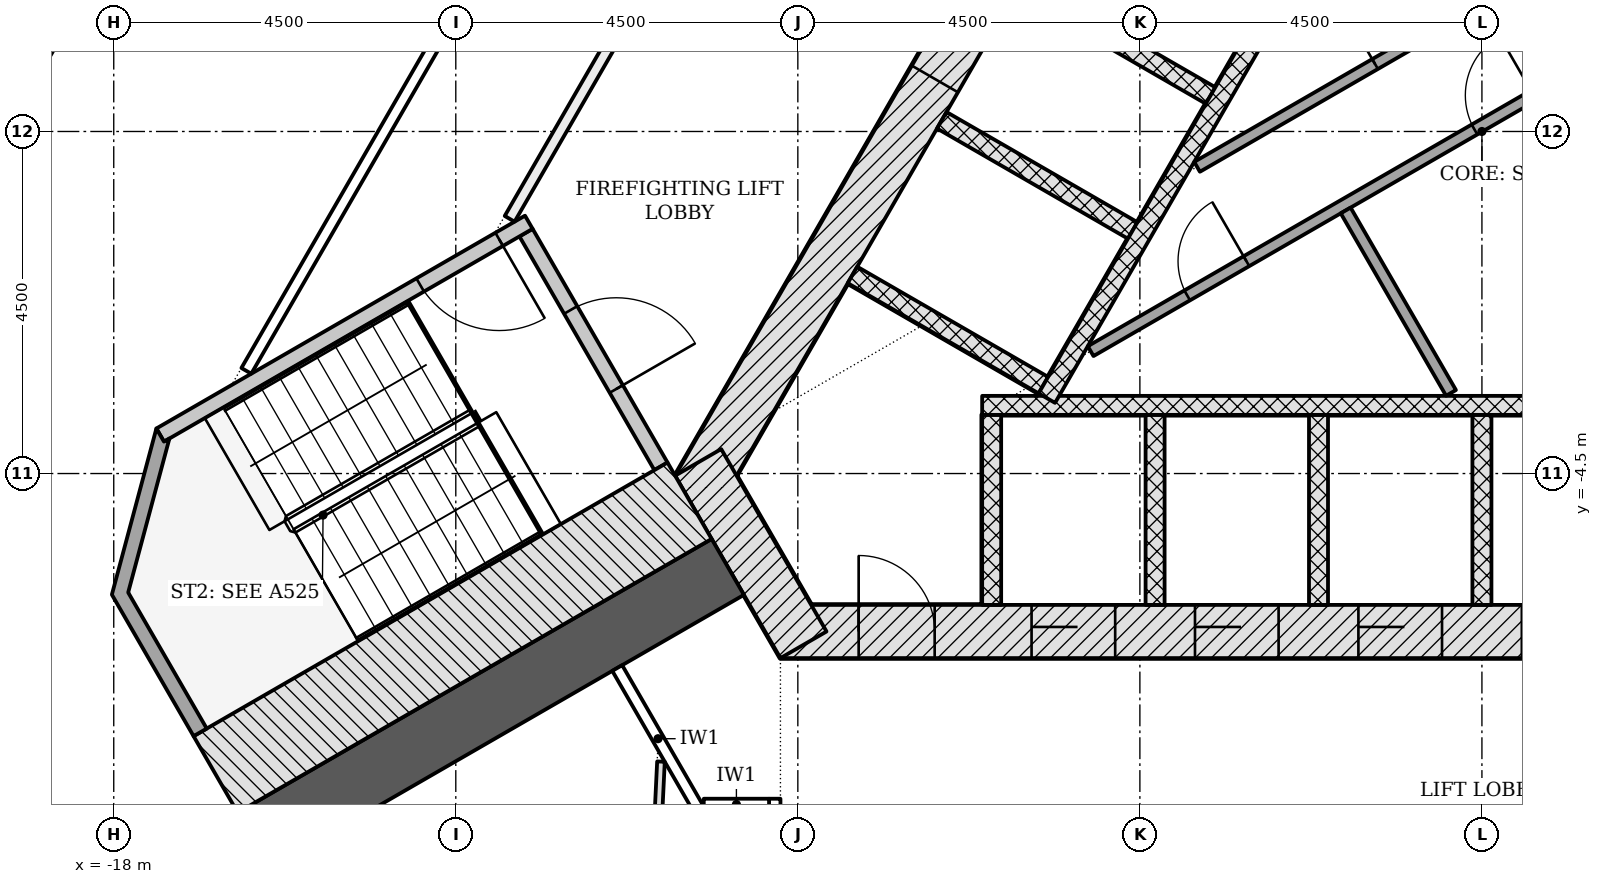
"""IFC4 building model, lengths in metres.
Left out: names, types, materials, properties, quantities, classifications, styles, units other than length and angle.
Written with IfcOpenShell. Run it as: python <this file> out.ifc"""

import sys

from ifc_helpers import new_model, si_unit, direction, frame, frame_2d, origin, place, context, subcontext, project, spatial, polyline, rectangle, outline, extrude, element, fill, save


model = new_model("IFC4")
c1 = context("Model", 3, precision=1e-05, world=origin(), true_north=direction((0.0, 1.0)))
c2 = subcontext(c1, "Body", "Model", "MODEL_VIEW")
j1 = project(units=[si_unit("LENGTHUNIT", "METRE"), si_unit("PLANEANGLEUNIT", "RADIAN")], contexts=[c1])
p1 = place(None, origin())
s1 = spatial("IfcSite", under=j1, at=p1, CompositionType="ELEMENT")
p2 = place(p1, origin())
s2 = spatial("IfcBuilding", under=s1, at=p2, CompositionType="ELEMENT")
p3 = place(p2, frame((0.0, 0.0, 69.0)))
s3 = spatial("IfcBuildingStorey", under=s2, at=p3, CompositionType="ELEMENT", Elevation=69.0)
p4 = place(p3, frame((-9.229, -6.578, -0.2), z_axis=(0.0, 0.0, 1.0), x_axis=(1.0, 0.0, 0.0)))
e1 = element("IfcWall", 1, at=p4, inside=s3, PredefinedType="SHEAR", context=c2, shape_type="SweptSolid", body=[
    extrude(rectangle(XDim=18.458, YDim=0.7, at=frame_2d((9.229, 0.0))), origin(), (0.0, 0.0, 1.0), 3.6),
])
p5 = place(p4, frame((3.304, 0.0, 0.2)))
e2 = element("IfcOpeningElement", 2, at=p5, cuts=e1, PredefinedType="OPENING", context=c2, shape_type="SweptSolid", body=[
    extrude(rectangle(XDim=1.1, YDim=2.1, at=frame_2d((0.55, 1.05))), frame((0.0, 0.36, 0.0), z_axis=(0.0, -1.0, 0.0), x_axis=(1.0, 0.0, 0.0)), (0.0, 0.0, 1.0), 0.72),
])
p6 = place(p4, frame((5.454, 0.0, 0.2)))
e3 = element("IfcOpeningElement", 3, at=p6, cuts=e1, PredefinedType="OPENING", context=c2, shape_type="SweptSolid", body=[
    extrude(rectangle(XDim=1.1, YDim=2.1, at=frame_2d((0.55, 1.05))), frame((0.0, 0.36, 0.0), z_axis=(0.0, -1.0, 0.0), x_axis=(1.0, 0.0, 0.0)), (0.0, 0.0, 1.0), 0.72),
])
p7 = place(p4, frame((7.604, 0.0, 0.2)))
e4 = element("IfcOpeningElement", 4, at=p7, cuts=e1, PredefinedType="OPENING", context=c2, shape_type="SweptSolid", body=[
    extrude(rectangle(XDim=1.1, YDim=2.1, at=frame_2d((0.55, 1.05))), frame((0.0, 0.36, 0.0), z_axis=(0.0, -1.0, 0.0), x_axis=(1.0, 0.0, 0.0)), (0.0, 0.0, 1.0), 0.72),
])
p8 = place(p4, frame((9.754, 0.0, 0.2)))
e5 = element("IfcOpeningElement", 5, at=p8, cuts=e1, PredefinedType="OPENING", context=c2, shape_type="SweptSolid", body=[
    extrude(rectangle(XDim=1.1, YDim=2.1, at=frame_2d((0.55, 1.05))), frame((0.0, 0.36, 0.0), z_axis=(0.0, -1.0, 0.0), x_axis=(1.0, 0.0, 0.0)), (0.0, 0.0, 1.0), 0.72),
])
p9 = place(p4, frame((11.904, 0.0, 0.2)))
e6 = element("IfcOpeningElement", 6, at=p9, cuts=e1, PredefinedType="OPENING", context=c2, shape_type="SweptSolid", body=[
    extrude(rectangle(XDim=1.1, YDim=2.1, at=frame_2d((0.55, 1.05))), frame((0.0, 0.36, 0.0), z_axis=(0.0, -1.0, 0.0), x_axis=(1.0, 0.0, 0.0)), (0.0, 0.0, 1.0), 0.72),
])
p10 = place(p4, frame((14.054, 0.0, 0.2)))
e7 = element("IfcOpeningElement", 7, at=p10, cuts=e1, PredefinedType="OPENING", context=c2, shape_type="SweptSolid", body=[
    extrude(rectangle(XDim=1.1, YDim=2.1, at=frame_2d((0.55, 1.05))), frame((0.0, 0.36, 0.0), z_axis=(0.0, -1.0, 0.0), x_axis=(1.0, 0.0, 0.0)), (0.0, 0.0, 1.0), 0.72),
])
p11 = place(p4, frame((1.029, 0.0, 0.2)))
e8 = element("IfcOpeningElement", 8, at=p11, cuts=e1, PredefinedType="OPENING", context=c2, shape_type="SweptSolid", body=[
    extrude(rectangle(XDim=1.0, YDim=2.1, at=frame_2d((0.5, 1.05))), frame((0.0, 0.36, 0.0), z_axis=(0.0, -1.0, 0.0), x_axis=(1.0, 0.0, 0.0)), (0.0, 0.0, 1.0), 0.72),
])
p12 = place(p3, frame((-1.083, 11.281, -0.2), z_axis=(0.0, 0.0, 1.0), x_axis=(-0.500001446645, -0.866024568562, 0.0)))
e9 = element("IfcWall", 9, at=p12, inside=s3, PredefinedType="SHEAR", context=c2, shape_type="SweptSolid", body=[
    extrude(rectangle(XDim=18.458, YDim=0.7, at=frame_2d((9.229, 0.0))), origin(), (0.0, 0.0, 1.0), 3.6),
])
p13 = place(p12, frame((8.979, 0.0, 0.2)))
e10 = element("IfcOpeningElement", 10, at=p13, cuts=e9, PredefinedType="OPENING", context=c2, shape_type="SweptSolid", body=[
    extrude(rectangle(XDim=1.2, YDim=2.1, at=frame_2d((0.6, 1.05))), frame((0.0, 0.36, 0.0), z_axis=(0.0, -1.0, 0.0), x_axis=(1.0, 0.0, 0.0)), (0.0, 0.0, 1.0), 0.72),
])
p14 = place(p12, frame((11.029, 0.0, 0.2)))
e11 = element("IfcOpeningElement", 11, at=p14, cuts=e9, PredefinedType="OPENING", context=c2, shape_type="SweptSolid", body=[
    extrude(rectangle(XDim=1.2, YDim=2.1, at=frame_2d((0.6, 1.05))), frame((0.0, 0.36, 0.0), z_axis=(0.0, -1.0, 0.0), x_axis=(1.0, 0.0, 0.0)), (0.0, 0.0, 1.0), 0.72),
])
p15 = place(p3, frame((-10.311, -4.353, -0.2), z_axis=(0.0, 0.0, 1.0), x_axis=(0.500042739161, -0.866000726912, 0.0)))
e12 = element("IfcWall", 12, at=p15, inside=s3, PredefinedType="SHEAR", context=c2, shape_type="SweptSolid", body=[
    extrude(rectangle(XDim=2.771, YDim=0.7, at=frame_2d((1.386, 0.0))), origin(), (0.0, 0.0, 1.0), 3.6),
])
p16 = place(p3, frame((-9.922, -5.728, -0.2), z_axis=(0.0, 0.0, 1.0), x_axis=(-0.866026077102, -0.499998833779, 0.0)))
e13 = element("IfcWall", 13, at=p16, inside=s3, PredefinedType="SHEAR", context=c2, shape_type="SweptSolid", body=[
    extrude(rectangle(XDim=13.381, YDim=0.85, at=frame_2d((6.691, 0.0))), origin(), (0.0, 0.0, 1.0), 3.6),
])
for number, where, z_axis, x_axis in (
    (14, (-6.45, -6.228, -0.2), (0.0, 0.0, 1.0), (0.0, 1.0, 0.0)),
    (15, (-4.3, -6.228, -0.2), (0.0, 0.0, 1.0), (0.0, 1.0, 0.0)),
    (16, (-2.15, -6.228, -0.2), (0.0, 0.0, 1.0), (0.0, 1.0, 0.0)),
    (17, (0.0, -6.228, -0.2), (0.0, 0.0, 1.0), (0.0, 1.0, 0.0)),
):
    element("IfcWall", number, at=place(p3, frame(where, z_axis=z_axis, x_axis=x_axis)), inside=s3, PredefinedType="PARTITIONING", context=c2, shape_type="SweptSolid", body=[
        extrude(rectangle(XDim=2.5, YDim=0.25, at=frame_2d((1.25, 0.0))), origin(), (0.0, 0.0, 1.0), 3.6),
    ])
p17 = place(p3, frame((-6.575, -3.603, 0.0), z_axis=(0.0, 0.0, 1.0), x_axis=(1.0, 0.0, 0.0)))
e18 = element("IfcWall", 18, at=p17, inside=s3, PredefinedType="PARTITIONING", context=c2, shape_type="SweptSolid", body=[
    extrude(rectangle(XDim=13.15, YDim=0.25, at=frame_2d((6.575, 0.0))), origin(), (0.0, 0.0, 1.0), 3.4),
])
for number, where, z_axis, x_axis in (
    (19, (-6.081, 1.923, -0.2), (0.0, 0.0, 1.0), (0.866, -0.5, 0.0)),
    (20, (-7.106, 0.148, -0.2), (0.0, 0.0, 1.0), (0.866, -0.5, 0.0)),
    (21, (-8.281, -1.887, -0.2), (0.0, 0.0, 1.0), (0.866, -0.5, 0.0)),
):
    element("IfcWall", number, at=place(p3, frame(where, z_axis=z_axis, x_axis=x_axis)), inside=s3, PredefinedType="PARTITIONING", context=c2, shape_type="SweptSolid", body=[
        extrude(rectangle(XDim=2.9, YDim=0.25, at=frame_2d((1.45, 0.0))), origin(), (0.0, 0.0, 1.0), 3.6),
    ])
p18 = place(p3, frame((0.176, 6.711, 0.0), z_axis=(0.0, 0.0, 1.0), x_axis=(-0.500004227369, -0.866022963098, 0.0)))
e22 = element("IfcWall", 22, at=p18, inside=s3, PredefinedType="PARTITIONING", context=c2, shape_type="SweptSolid", body=[
    extrude(rectangle(XDim=11.8, YDim=0.25, at=frame_2d((5.9, 0.0))), origin(), (0.0, 0.0, 1.0), 3.4),
])
p19 = place(p3, frame((-5.148, -2.89, 0.0), z_axis=(0.0, 0.0, 1.0), x_axis=(0.866030081544, 0.499991897794, 0.0)))
e23 = element("IfcWall", 23, at=p19, inside=s3, PredefinedType="PARTITIONING", context=c2, shape_type="SweptSolid", body=[
    extrude(rectangle(XDim=12.131, YDim=0.15, at=frame_2d((6.065, 0.0))), origin(), (0.0, 0.0, 1.0), 3.4),
])
p20 = place(p19, frame((5.831, 0.0, 0.0)))
e24 = element("IfcOpeningElement", 24, at=p20, cuts=e23, PredefinedType="OPENING", context=c2, shape_type="SweptSolid", body=[
    extrude(rectangle(XDim=0.9, YDim=2.1, at=frame_2d((0.45, 1.05))), frame((0.0, 0.085, 0.0), z_axis=(0.0, -1.0, 0.0), x_axis=(1.0, 0.0, 0.0)), (0.0, 0.0, 1.0), 0.17),
])
p21 = place(p19, frame((1.467, 0.0, 0.0)))
e25 = element("IfcOpeningElement", 25, at=p21, cuts=e23, PredefinedType="OPENING", context=c2, shape_type="SweptSolid", body=[
    extrude(rectangle(XDim=0.9, YDim=2.1, at=frame_2d((0.45, 1.05))), frame((0.0, 0.085, 0.0), z_axis=(0.0, -1.0, 0.0), x_axis=(1.0, 0.0, 0.0)), (0.0, 0.0, 1.0), 0.17),
])
p22 = place(p3, frame((-3.748, -0.465, 0.0), z_axis=(0.0, 0.0, 1.0), x_axis=(0.866033540873, 0.499985905884, 0.0)))
e26 = element("IfcWall", 26, at=p22, inside=s3, PredefinedType="PARTITIONING", context=c2, shape_type="SweptSolid", body=[
    extrude(rectangle(XDim=9.706, YDim=0.15, at=frame_2d((4.853, 0.0))), origin(), (0.0, 0.0, 1.0), 3.4),
])
p23 = place(p22, frame((2.704, 0.0, 0.0)))
e27 = element("IfcOpeningElement", 27, at=p23, cuts=e26, PredefinedType="OPENING", context=c2, shape_type="SweptSolid", body=[
    extrude(rectangle(XDim=0.9, YDim=2.1, at=frame_2d((0.45, 1.05))), frame((0.0, 0.085, 0.0), z_axis=(0.0, -1.0, 0.0), x_axis=(1.0, 0.0, 0.0)), (0.0, 0.0, 1.0), 0.17),
])
p24 = place(p3, frame((-0.407, -3.439, 0.0), z_axis=(0.0, 0.0, 1.0), x_axis=(-0.500004591975, 0.86602275259, 0.0)))
e28 = element("IfcWall", 28, at=p24, inside=s3, PredefinedType="PARTITIONING", context=c2, shape_type="SweptSolid", body=[
    extrude(rectangle(XDim=2.771, YDim=0.15, at=frame_2d((1.386, 0.0))), origin(), (0.0, 0.0, 1.0), 3.4),
])
p25 = place(p3, frame((-12.576, -1.331, -0.2), z_axis=(0.0, 0.0, 1.0), x_axis=(0.499970499736, -0.8660424351, 0.0)))
e29 = element("IfcWall", 29, at=p25, inside=s3, PredefinedType="SHEAR", context=c2, shape_type="SweptSolid", body=[
    extrude(rectangle(XDim=3.55, YDim=0.2, at=frame_2d((1.775, 0.0))), origin(), (0.0, 0.0, 1.0), 3.6),
])
p26 = place(p25, frame((1.175, 0.0, 0.2)))
e30 = element("IfcOpeningElement", 30, at=p26, cuts=e29, PredefinedType="OPENING", context=c2, shape_type="SweptSolid", body=[
    extrude(rectangle(XDim=1.2, YDim=2.1, at=frame_2d((0.6, 1.05))), frame((0.0, 0.11, 0.0), z_axis=(0.0, -1.0, 0.0), x_axis=(1.0, 0.0, 0.0)), (0.0, 0.0, 1.0), 0.22),
])
p27 = place(p3, frame((-12.539, -1.194, -0.2), z_axis=(0.0, 0.0, 1.0), x_axis=(-0.866045472092, -0.499965239061, 0.0)))
e31 = element("IfcWall", 31, at=p27, inside=s3, PredefinedType="SHEAR", context=c2, shape_type="SweptSolid", body=[
    extrude(rectangle(XDim=5.6, YDim=0.2, at=frame_2d((2.8, 0.0))), origin(), (0.0, 0.0, 1.0), 3.6),
])
p28 = place(p27, frame((0.45, 0.0, 0.2)))
e32 = element("IfcOpeningElement", 32, at=p28, cuts=e31, PredefinedType="OPENING", context=c2, shape_type="SweptSolid", body=[
    extrude(rectangle(XDim=1.2, YDim=2.1, at=frame_2d((0.6, 1.05))), frame((0.0, 0.11, 0.0), z_axis=(0.0, -1.0, 0.0), x_axis=(1.0, 0.0, 0.0)), (0.0, 0.0, 1.0), 0.22),
])
p29 = place(p3, frame((-10.424, -4.858, -0.2), z_axis=(0.0, 0.0, 1.0), x_axis=(-0.866033125095, -0.499986626058, 0.0)))
e33 = element("IfcWall", 33, at=p29, inside=s3, PredefinedType="SHEAR", context=c2, shape_type="SweptSolid", body=[
    extrude(rectangle(XDim=7.2, YDim=1.161, at=frame_2d((3.6, 0.0))), origin(), (0.0, 0.0, 1.0), 3.6),
])
p30 = place(p3, frame((0.0, 0.0, -0.2)))
e34 = element("IfcWall", 34, at=p30, inside=s3, PredefinedType="SHEAR", context=c2, shape_type="SweptSolid", body=[
    extrude(outline(polyline([(-17.439, -3.907), (-18.025, -6.093), (-16.95, -7.955), (-16.777, -7.855), (-17.81, -6.065), (-17.267, -4.039), (-17.339, -4.081), (-17.339, -4.081), (-17.339, -4.081), (-17.339, -4.081), (-17.339, -4.081), (-17.339, -4.081), (-17.339, -4.081), (-17.339, -4.081), (-17.339, -4.081), (-17.339, -4.081), (-17.339, -4.081), (-17.339, -4.081), (-17.339, -4.081), (-17.339, -4.081), (-17.339, -4.081), (-17.339, -4.081), (-17.339, -4.081), (-17.439, -3.907)])), origin(), (0.0, 0.0, 1.0), 3.6),
])
p31 = place(p3, frame((-16.256, -3.149, 0.0), z_axis=(0.0, 0.0, 1.0), x_axis=(0.499999683919, 0.866025586274, 0.0)))
e35 = element("IfcWall", 35, at=p31, inside=s3, PredefinedType="PARTITIONING", context=c2, shape_type="SweptSolid", body=[
    extrude(rectangle(XDim=22.234, YDim=0.15, at=frame_2d((11.117, 0.0))), origin(), (0.0, 0.0, 1.0), 2.778),
])
p32 = place(p31, frame((13.551, 0.0, 0.0)))
e36 = element("IfcOpeningElement", 36, at=p32, cuts=e35, PredefinedType="OPENING", context=c2, shape_type="SweptSolid", body=[
    extrude(rectangle(XDim=1.0, YDim=2.1, at=frame_2d((0.5, 1.05))), frame((0.0, 0.085, 0.0), z_axis=(0.0, -1.0, 0.0), x_axis=(1.0, 0.0, 0.0)), (0.0, 0.0, 1.0), 0.17),
])
p33 = place(p31, frame((5.647, 0.0, 0.0)))
e37 = element("IfcOpeningElement", 37, at=p33, cuts=e35, PredefinedType="OPENING", context=c2, shape_type="SweptSolid", body=[
    extrude(rectangle(XDim=1.5, YDim=2.1, at=frame_2d((0.75, 1.05))), frame((0.0, 0.085, 0.0), z_axis=(0.0, -1.0, 0.0), x_axis=(1.0, 0.0, 0.0)), (0.0, 0.0, 1.0), 0.17),
])
p34 = place(p3, frame((-4.407, 13.374, 0.0), z_axis=(0.0, 0.0, 1.0), x_axis=(-0.499997181693, -0.866027030928, 0.0)))
e38 = element("IfcWall", 38, at=p34, inside=s3, PredefinedType="PARTITIONING", context=c2, shape_type="SweptSolid", body=[
    extrude(rectangle(XDim=16.77, YDim=0.15, at=frame_2d((8.385, 0.0))), origin(), (0.0, 0.0, 1.0), 2.778),
])
p35 = place(p34, frame((8.879, 0.0, 0.0)))
e39 = element("IfcOpeningElement", 39, at=p35, cuts=e38, PredefinedType="OPENING", context=c2, shape_type="SweptSolid", body=[
    extrude(rectangle(XDim=1.0, YDim=2.1, at=frame_2d((0.5, 1.05))), frame((0.0, 0.085, 0.0), z_axis=(0.0, -1.0, 0.0), x_axis=(1.0, 0.0, 0.0)), (0.0, 0.0, 1.0), 0.17),
])
p36 = place(p3, frame((-11.376, -7.059, 0.0), z_axis=(0.0, 0.0, 1.0), x_axis=(0.500076779081, -0.865981070823, 0.0)))
e40 = element("IfcWall", 40, at=p36, inside=s3, PredefinedType="PARTITIONING", context=c2, shape_type="SweptSolid", body=[
    extrude(rectangle(XDim=2.147, YDim=0.15, at=frame_2d((1.074, 0.0))), origin(), (0.0, 0.0, 1.0), 2.778),
])
p37 = place(p3, frame((-9.304, -10.428, 0.0), z_axis=(0.0, 0.0, 1.0), x_axis=(0.0, 1.0, 0.0)))
e41 = element("IfcWall", 41, at=p37, inside=s3, PredefinedType="PARTITIONING", context=c2, shape_type="SweptSolid", body=[
    extrude(rectangle(XDim=1.65, YDim=0.15, at=frame_2d((0.825, 0.0))), origin(), (0.0, 0.0, 1.0), 3.4),
])
p38 = place(p3, frame((-10.238, -8.853, 0.0), z_axis=(0.0, 0.0, 1.0), x_axis=(1.0, 0.0, 0.0)))
e42 = element("IfcWall", 42, at=p38, inside=s3, PredefinedType="PARTITIONING", context=c2, shape_type="SweptSolid", body=[
    extrude(rectangle(XDim=0.859, YDim=0.15, at=frame_2d((0.43, 0.0))), origin(), (0.0, 0.0, 1.0), 3.4),
])
p39 = place(p3, frame((-11.207, -16.709, 0.0), z_axis=(0.0, 0.0, 1.0), x_axis=(0.048196786961, 0.998837859578, 0.0)))
e43 = element("IfcWall", 43, at=p39, inside=s3, PredefinedType="PARTITIONING", context=c2, shape_type="SweptSolid", body=[
    extrude(rectangle(XDim=8.429, YDim=0.1, at=frame_2d((4.214, 0.0))), origin(), (0.0, 0.0, 1.0), 2.778),
])
p40 = place(p39, frame((5.868, 0.0, 0.0)))
e44 = element("IfcOpeningElement", 44, at=p40, cuts=e43, PredefinedType="OPENING", context=c2, shape_type="SweptSolid", body=[
    extrude(rectangle(XDim=1.0, YDim=2.1, at=frame_2d((0.5, 1.05))), frame((0.0, 0.06, 0.0), z_axis=(0.0, -1.0, 0.0), x_axis=(1.0, 0.0, 0.0)), (0.0, 0.0, 1.0), 0.12),
])
p41 = place(p39, frame((1.635, 0.0, 0.0)))
e45 = element("IfcOpeningElement", 45, at=p41, cuts=e43, PredefinedType="OPENING", context=c2, shape_type="SweptSolid", body=[
    extrude(rectangle(XDim=1.0, YDim=2.1, at=frame_2d((0.5, 1.05))), frame((0.0, 0.06, 0.0), z_axis=(0.0, -1.0, 0.0), x_axis=(1.0, 0.0, 0.0)), (0.0, 0.0, 1.0), 0.12),
])
p42 = place(p5, origin())
e46 = element("IfcDoor", 46, at=p42, inside=s3, OperationType="DOUBLE_DOOR_SLIDING", PredefinedType="DOOR", context=c2, shape_type="SweptSolid", body=[
    extrude(rectangle(XDim=1.1, YDim=2.1, at=frame_2d((0.55, 1.05))), frame((0.0, 0.025, 0.0), z_axis=(0.0, -1.0, 0.0), x_axis=(1.0, 0.0, 0.0)), (0.0, 0.0, 1.0), 0.05),
])
fill(e2, e46)
p43 = place(p6, origin())
e47 = element("IfcDoor", 47, at=p43, inside=s3, OperationType="DOUBLE_DOOR_SLIDING", PredefinedType="DOOR", context=c2, shape_type="SweptSolid", body=[
    extrude(rectangle(XDim=1.1, YDim=2.1, at=frame_2d((0.55, 1.05))), frame((0.0, 0.025, 0.0), z_axis=(0.0, -1.0, 0.0), x_axis=(1.0, 0.0, 0.0)), (0.0, 0.0, 1.0), 0.05),
])
fill(e3, e47)
p44 = place(p7, origin())
e48 = element("IfcDoor", 48, at=p44, inside=s3, OperationType="DOUBLE_DOOR_SLIDING", PredefinedType="DOOR", context=c2, shape_type="SweptSolid", body=[
    extrude(rectangle(XDim=1.1, YDim=2.1, at=frame_2d((0.55, 1.05))), frame((0.0, 0.025, 0.0), z_axis=(0.0, -1.0, 0.0), x_axis=(1.0, 0.0, 0.0)), (0.0, 0.0, 1.0), 0.05),
])
fill(e4, e48)
p45 = place(p8, origin())
e49 = element("IfcDoor", 49, at=p45, inside=s3, OperationType="DOUBLE_DOOR_SLIDING", PredefinedType="DOOR", context=c2, shape_type="SweptSolid", body=[
    extrude(rectangle(XDim=1.1, YDim=2.1, at=frame_2d((0.55, 1.05))), frame((0.0, 0.025, 0.0), z_axis=(0.0, -1.0, 0.0), x_axis=(1.0, 0.0, 0.0)), (0.0, 0.0, 1.0), 0.05),
])
fill(e5, e49)
p46 = place(p14, origin())
e50 = element("IfcDoor", 50, at=p46, inside=s3, OperationType="DOUBLE_DOOR_SLIDING", PredefinedType="DOOR", context=c2, shape_type="SweptSolid", body=[
    extrude(rectangle(XDim=1.2, YDim=2.1, at=frame_2d((0.6, 1.05))), frame((0.0, 0.025, 0.0), z_axis=(0.0, -1.0, 0.0), x_axis=(1.0, 0.0, 0.0)), (0.0, 0.0, 1.0), 0.05),
])
fill(e11, e50)
p47 = place(p20, origin())
e51 = element("IfcDoor", 51, at=p47, inside=s3, OperationType="SINGLE_SWING_RIGHT", PredefinedType="DOOR", context=c2, shape_type="SweptSolid", body=[
    extrude(rectangle(XDim=0.9, YDim=2.1, at=frame_2d((0.45, 1.05))), frame((0.0, 0.025, 0.0), z_axis=(0.0, -1.0, 0.0), x_axis=(1.0, 0.0, 0.0)), (0.0, 0.0, 1.0), 0.05),
])
fill(e24, e51)
p48 = place(p23, origin())
e52 = element("IfcDoor", 52, at=p48, inside=s3, OperationType="SINGLE_SWING_LEFT", PredefinedType="DOOR", context=c2, shape_type="SweptSolid", body=[
    extrude(rectangle(XDim=0.9, YDim=2.1, at=frame_2d((0.45, 1.05))), frame((0.0, 0.025, 0.0), z_axis=(0.0, -1.0, 0.0), x_axis=(1.0, 0.0, 0.0)), (0.0, 0.0, 1.0), 0.05),
])
fill(e27, e52)
p49 = place(p21, origin())
e53 = element("IfcDoor", 53, at=p49, inside=s3, OperationType="SINGLE_SWING_RIGHT", PredefinedType="DOOR", context=c2, shape_type="SweptSolid", body=[
    extrude(rectangle(XDim=0.9, YDim=2.1, at=frame_2d((0.45, 1.05))), frame((0.0, 0.025, 0.0), z_axis=(0.0, -1.0, 0.0), x_axis=(1.0, 0.0, 0.0)), (0.0, 0.0, 1.0), 0.05),
])
fill(e25, e53)
p50 = place(p11, origin())
e54 = element("IfcDoor", 54, at=p50, inside=s3, OperationType="SINGLE_SWING_LEFT", PredefinedType="DOOR", context=c2, shape_type="SweptSolid", body=[
    extrude(rectangle(XDim=1.0, YDim=2.1, at=frame_2d((0.5, 1.05))), frame((0.0, 0.075, 0.0), z_axis=(0.0, -1.0, 0.0), x_axis=(1.0, 0.0, 0.0)), (0.0, 0.0, 1.0), 0.15),
])
fill(e8, e54)
p51 = place(p26, origin())
e55 = element("IfcDoor", 55, at=p51, inside=s3, OperationType="SINGLE_SWING_RIGHT", PredefinedType="DOOR", context=c2, shape_type="SweptSolid", body=[
    extrude(rectangle(XDim=1.2, YDim=2.1, at=frame_2d((0.6, 1.05))), frame((0.0, 0.025, 0.0), z_axis=(0.0, -1.0, 0.0), x_axis=(1.0, 0.0, 0.0)), (0.0, 0.0, 1.0), 0.05),
])
fill(e30, e55)
p52 = place(p28, origin())
e56 = element("IfcDoor", 56, at=p52, inside=s3, OperationType="SINGLE_SWING_LEFT", PredefinedType="DOOR", context=c2, shape_type="SweptSolid", body=[
    extrude(rectangle(XDim=1.2, YDim=2.1, at=frame_2d((0.6, 1.05))), frame((0.0, 0.025, 0.0), z_axis=(0.0, -1.0, 0.0), x_axis=(1.0, 0.0, 0.0)), (0.0, 0.0, 1.0), 0.05),
])
fill(e32, e56)
save(model, sys.argv[1])
